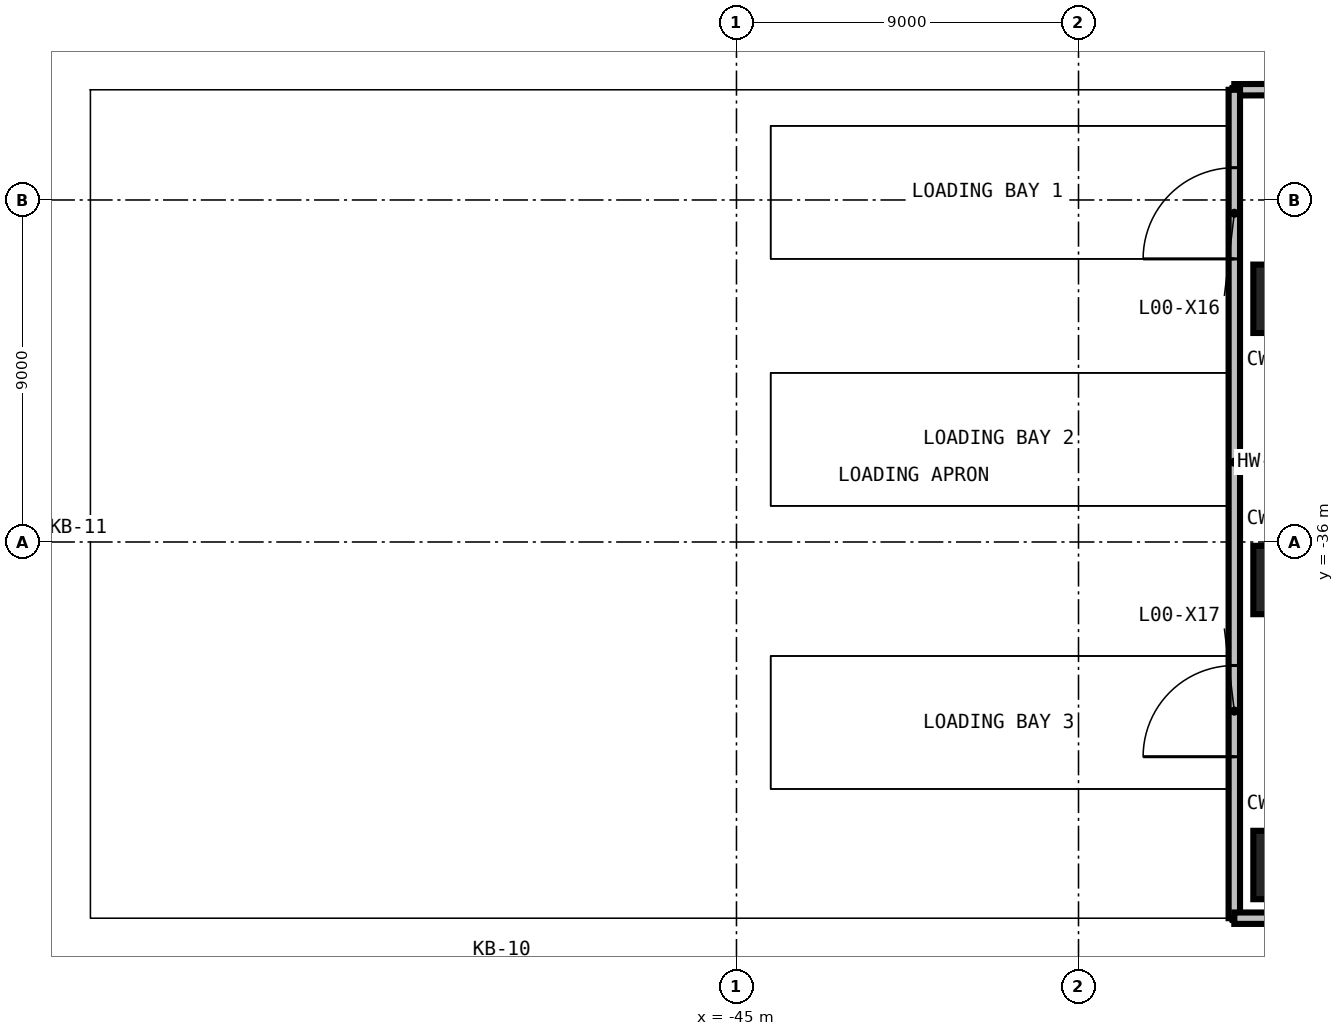
"""IFC4 building model, lengths in metres.
Left out: names, types, materials, properties, quantities, classifications, styles, units other than length and angle.
Written with IfcOpenShell. Run it as: python <this file> out.ifc"""

import sys

from ifc_helpers import new_model, si_unit, direction, frame, frame_2d, origin, origin_2d, place, context, subcontext, project, spatial, rectangle, extrude, element, fill, save


model = new_model("IFC4")
c1 = context("Model", 3, precision=1e-05, world=origin(), true_north=direction((0.0, 1.0)))
c2 = subcontext(c1, "Body", "Model", "MODEL_VIEW")
j1 = project(units=[si_unit("LENGTHUNIT", "METRE"), si_unit("PLANEANGLEUNIT", "RADIAN")], contexts=[c1])
p1 = place(None, origin())
s1 = spatial("IfcSite", under=j1, at=p1, CompositionType="ELEMENT")
p2 = place(p1, origin())
s2 = spatial("IfcBuilding", under=s1, at=p2, CompositionType="ELEMENT")
p3 = place(p2, origin())
s3 = spatial("IfcBuildingStorey", under=s2, at=p3, CompositionType="ELEMENT", Elevation=0.0)
for number, where, z_axis, x_axis in (
    (1, (-30.5, -44.5, 0.0), (0.0, 0.0, 1.0), (1.0, 0.0, 0.0)),
    (2, (-30.5, -37.0, 0.0), (0.0, 0.0, 1.0), (1.0, 0.0, 0.0)),
    (3, (-30.5, -29.6, 0.0), (0.0, 0.0, 1.0), (1.0, 0.0, 0.0)),
):
    element("IfcColumn", number, at=place(p3, frame(where, z_axis=z_axis, x_axis=x_axis)), inside=s3, PredefinedType="COLUMN", context=c2, shape_type="SweptSolid", body=[
        extrude(rectangle(XDim=1.8, YDim=1.8, at=origin_2d()), origin(), (0.0, 0.0, 1.0), 8.55),
    ])
p4 = place(p3, frame((-31.9, -24.1, 0.0), z_axis=(0.0, 0.0, 1.0), x_axis=(0.999994137621, 0.003424138458, 0.0)))
e4 = element("IfcWall", 4, at=p4, inside=s3, PredefinedType="SOLIDWALL", context=c2, shape_type="SweptSolid", body=[
    extrude(rectangle(XDim=6.702, YDim=0.3, at=frame_2d((3.351, 0.0))), origin(), (0.0, 0.0, 1.0), 8.55),
])
p5 = place(p4, frame((2.151, 0.0, 0.0)))
e5 = element("IfcOpeningElement", 5, at=p5, cuts=e4, PredefinedType="OPENING", context=c2, shape_type="SweptSolid", body=[
    extrude(rectangle(XDim=2.4, YDim=2.4, at=frame_2d((1.2, 1.2))), frame((0.0, 0.16, 0.0), z_axis=(0.0, -1.0, 0.0), x_axis=(1.0, 0.0, 0.0)), (0.0, 0.0, 1.0), 0.32),
])
p6 = place(p3, frame((-31.9, -45.9, 0.0), z_axis=(0.0, 0.0, 1.0), x_axis=(0.0, 1.0, 0.0)))
e6 = element("IfcWall", 6, at=p6, inside=s3, PredefinedType="SOLIDWALL", context=c2, shape_type="SweptSolid", body=[
    extrude(rectangle(XDim=21.8, YDim=0.3, at=frame_2d((10.9, 0.0))), origin(), (0.0, 0.0, 1.0), 8.55),
])
p7 = place(p6, frame((17.35, 0.0, 0.0)))
e7 = element("IfcOpeningElement", 7, at=p7, cuts=e6, PredefinedType="OPENING", context=c2, shape_type="SweptSolid", body=[
    extrude(rectangle(XDim=2.4, YDim=2.4, at=frame_2d((1.2, 1.2))), frame((0.0, 0.16, 0.0), z_axis=(0.0, -1.0, 0.0), x_axis=(1.0, 0.0, 0.0)), (0.0, 0.0, 1.0), 0.32),
])
p8 = place(p6, frame((4.25, 0.0, 0.0)))
e8 = element("IfcOpeningElement", 8, at=p8, cuts=e6, PredefinedType="OPENING", context=c2, shape_type="SweptSolid", body=[
    extrude(rectangle(XDim=2.4, YDim=2.4, at=frame_2d((1.2, 1.2))), frame((0.0, 0.16, 0.0), z_axis=(0.0, -1.0, 0.0), x_axis=(1.0, 0.0, 0.0)), (0.0, 0.0, 1.0), 0.32),
])
p9 = place(p3, frame((7.9, -45.9, 0.0), z_axis=(0.0, 0.0, 1.0), x_axis=(-1.0, 0.0, 0.0)))
e9 = element("IfcWall", 9, at=p9, inside=s3, PredefinedType="SOLIDWALL", context=c2, shape_type="SweptSolid", body=[
    extrude(rectangle(XDim=39.8, YDim=0.3, at=frame_2d((19.9, 0.0))), origin(), (0.0, 0.0, 1.0), 8.55),
])
p10 = place(p9, frame((32.067, 0.0, 0.0)))
e10 = element("IfcOpeningElement", 10, at=p10, cuts=e9, PredefinedType="OPENING", context=c2, shape_type="SweptSolid", body=[
    extrude(rectangle(XDim=2.4, YDim=2.4, at=frame_2d((1.2, 1.2))), frame((0.0, 0.16, 0.0), z_axis=(0.0, -1.0, 0.0), x_axis=(1.0, 0.0, 0.0)), (0.0, 0.0, 1.0), 0.32),
])
p11 = place(p9, frame((18.7, 0.0, 0.0)))
e11 = element("IfcOpeningElement", 11, at=p11, cuts=e9, PredefinedType="OPENING", context=c2, shape_type="SweptSolid", body=[
    extrude(rectangle(XDim=2.4, YDim=2.4, at=frame_2d((1.2, 1.2))), frame((0.0, 0.16, 0.0), z_axis=(0.0, -1.0, 0.0), x_axis=(1.0, 0.0, 0.0)), (0.0, 0.0, 1.0), 0.32),
])
p12 = place(p9, frame((2.6, 0.0, 0.0)))
e12 = element("IfcOpeningElement", 12, at=p12, cuts=e9, PredefinedType="OPENING", context=c2, shape_type="SweptSolid", body=[
    extrude(rectangle(XDim=1.8, YDim=2.4, at=frame_2d((0.9, 1.2))), frame((0.0, 0.16, 0.0), z_axis=(0.0, -1.0, 0.0), x_axis=(1.0, 0.0, 0.0)), (0.0, 0.0, 1.0), 0.32),
])
p13 = place(p7, origin())
e13 = element("IfcDoor", 13, at=p13, inside=s3, OperationType="SINGLE_SWING_LEFT", PredefinedType="DOOR", context=c2, shape_type="SweptSolid", body=[
    extrude(rectangle(XDim=2.4, YDim=2.4, at=frame_2d((1.2, 1.2))), frame((0.0, 0.025, 0.0), z_axis=(0.0, -1.0, 0.0), x_axis=(1.0, 0.0, 0.0)), (0.0, 0.0, 1.0), 0.05),
])
fill(e7, e13)
p14 = place(p8, origin())
e14 = element("IfcDoor", 14, at=p14, inside=s3, OperationType="SINGLE_SWING_LEFT", PredefinedType="DOOR", context=c2, shape_type="SweptSolid", body=[
    extrude(rectangle(XDim=2.4, YDim=2.4, at=frame_2d((1.2, 1.2))), frame((0.0, 0.025, 0.0), z_axis=(0.0, -1.0, 0.0), x_axis=(1.0, 0.0, 0.0)), (0.0, 0.0, 1.0), 0.05),
])
fill(e8, e14)
save(model, sys.argv[1])
